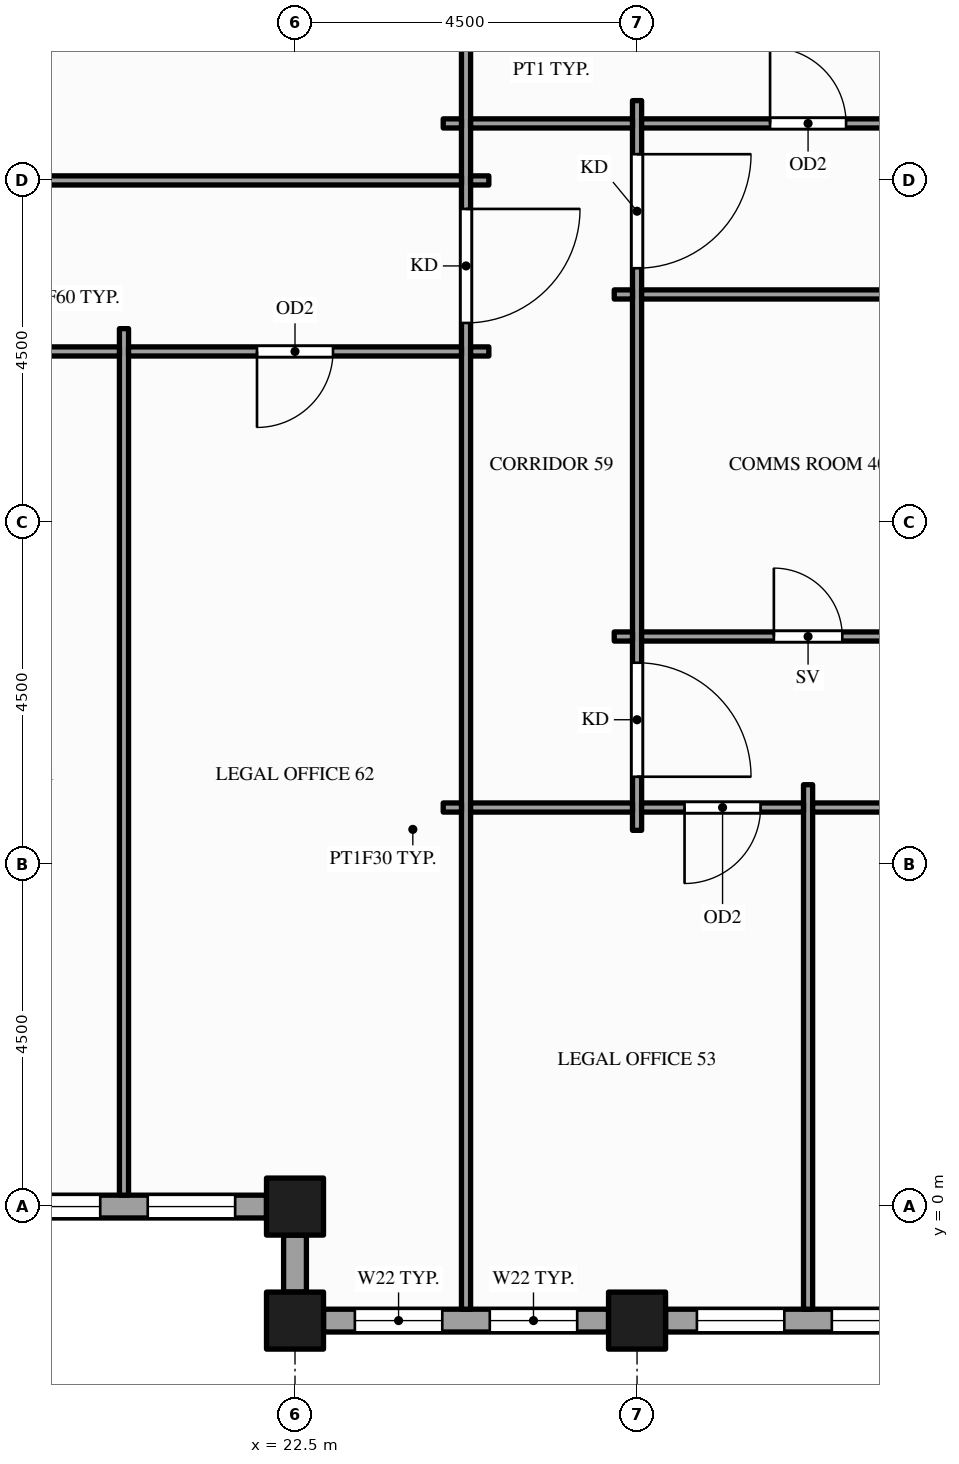
"""IFC4 building model, lengths in metres.
Left out: names, types, materials, properties, quantities, classifications, styles, units other than length and angle.
Written with IfcOpenShell. Run it as: python <this file> out.ifc"""

import sys

from ifc_helpers import new_model, si_unit, direction, frame, frame_2d, origin, origin_2d, place, context, subcontext, project, spatial, rectangle, hollow_rectangle, extrude, element, fill, save


model = new_model("IFC4")
c1 = context("Model", 3, precision=1e-05, world=origin(), true_north=direction((0.0, 1.0)))
c2 = subcontext(c1, "Body", "Model", "MODEL_VIEW")
j1 = project(units=[si_unit("LENGTHUNIT", "METRE"), si_unit("PLANEANGLEUNIT", "RADIAN")], contexts=[c1])
p1 = place(None, origin())
s1 = spatial("IfcSite", under=j1, at=p1, CompositionType="ELEMENT")
p2 = place(p1, origin())
s2 = spatial("IfcBuilding", under=s1, at=p2, CompositionType="ELEMENT")
p3 = place(p2, frame((0.0, 0.0, 239.0)))
s3 = spatial("IfcBuildingStorey", under=s2, at=p3, CompositionType="ELEMENT", Elevation=239.0)
for number, where, z_axis, x_axis in (
    (1, (22.5, -1.5, -0.15), (0.0, 0.0, 1.0), (1.0, 0.0, 0.0)),
    (2, (22.5, 0.0, -0.15), (0.0, 0.0, 1.0), (1.0, 0.0, 0.0)),
    (3, (27.0, -1.5, -0.15), (0.0, 0.0, 1.0), (1.0, 0.0, 0.0)),
):
    element("IfcColumn", number, at=place(p3, frame(where, z_axis=z_axis, x_axis=x_axis)), inside=s3, PredefinedType="COLUMN", context=c2, shape_type="SweptSolid", body=[
        extrude(hollow_rectangle(XDim=0.75, YDim=0.75, WallThickness=0.036, at=origin_2d()), origin(), (0.0, 0.0, 1.0), 3.85),
    ])
p4 = place(p3, frame((22.875, -1.5, 0.0), z_axis=(0.0, 0.0, 1.0), x_axis=(1.0, 0.0, 0.0)))
e4 = element("IfcWall", 4, at=p4, inside=s3, PredefinedType="STANDARD", context=c2, shape_type="SweptSolid", body=[
    extrude(rectangle(XDim=3.75, YDim=0.3, at=frame_2d((1.875, 0.0))), origin(), (0.0, 0.0, 1.0), 2.72),
])
p5 = place(p4, frame((0.413, 0.0, 0.9)))
e5 = element("IfcOpeningElement", 5, at=p5, cuts=e4, PredefinedType="OPENING", context=c2, shape_type="SweptSolid", body=[
    extrude(rectangle(XDim=1.15, YDim=1.5, at=frame_2d((0.575, 0.75))), frame((0.0, 0.16, 0.0), z_axis=(0.0, -1.0, 0.0), x_axis=(1.0, 0.0, 0.0)), (0.0, 0.0, 1.0), 0.32),
])
p6 = place(p4, frame((2.188, 0.0, 0.9)))
e6 = element("IfcOpeningElement", 6, at=p6, cuts=e4, PredefinedType="OPENING", context=c2, shape_type="SweptSolid", body=[
    extrude(rectangle(XDim=1.15, YDim=1.5, at=frame_2d((0.575, 0.75))), frame((0.0, 0.16, 0.0), z_axis=(0.0, -1.0, 0.0), x_axis=(1.0, 0.0, 0.0)), (0.0, 0.0, 1.0), 0.32),
])
p7 = place(p3, frame((27.375, -1.5, 0.0), z_axis=(0.0, 0.0, 1.0), x_axis=(1.0, 0.0, 0.0)))
e7 = element("IfcWall", 7, at=p7, inside=s3, PredefinedType="STANDARD", context=c2, shape_type="SweptSolid", body=[
    extrude(rectangle(XDim=3.75, YDim=0.3, at=frame_2d((1.875, 0.0))), origin(), (0.0, 0.0, 1.0), 2.72),
])
p8 = place(p7, frame((0.413, 0.0, 0.9)))
e8 = element("IfcOpeningElement", 8, at=p8, cuts=e7, PredefinedType="OPENING", context=c2, shape_type="SweptSolid", body=[
    extrude(rectangle(XDim=1.15, YDim=1.5, at=frame_2d((0.575, 0.75))), frame((0.0, 0.16, 0.0), z_axis=(0.0, -1.0, 0.0), x_axis=(1.0, 0.0, 0.0)), (0.0, 0.0, 1.0), 0.32),
])
p9 = place(p7, frame((2.188, 0.0, 0.9)))
e9 = element("IfcOpeningElement", 9, at=p9, cuts=e7, PredefinedType="OPENING", context=c2, shape_type="SweptSolid", body=[
    extrude(rectangle(XDim=1.15, YDim=1.5, at=frame_2d((0.575, 0.75))), frame((0.0, 0.16, 0.0), z_axis=(0.0, -1.0, 0.0), x_axis=(1.0, 0.0, 0.0)), (0.0, 0.0, 1.0), 0.32),
])
p10 = place(p3, frame((18.375, 0.0, 0.0), z_axis=(0.0, 0.0, 1.0), x_axis=(1.0, 0.0, 0.0)))
e10 = element("IfcWall", 10, at=p10, inside=s3, PredefinedType="STANDARD", context=c2, shape_type="SweptSolid", body=[
    extrude(rectangle(XDim=3.75, YDim=0.3, at=frame_2d((1.875, 0.0))), origin(), (0.0, 0.0, 1.0), 3.057),
])
p11 = place(p10, frame((0.413, 0.0, 0.9)))
e11 = element("IfcOpeningElement", 11, at=p11, cuts=e10, PredefinedType="OPENING", context=c2, shape_type="SweptSolid", body=[
    extrude(rectangle(XDim=1.15, YDim=2.0, at=frame_2d((0.575, 1.0))), frame((0.0, 0.16, 0.0), z_axis=(0.0, -1.0, 0.0), x_axis=(1.0, 0.0, 0.0)), (0.0, 0.0, 1.0), 0.32),
])
p12 = place(p10, frame((2.188, 0.0, 0.9)))
e12 = element("IfcOpeningElement", 12, at=p12, cuts=e10, PredefinedType="OPENING", context=c2, shape_type="SweptSolid", body=[
    extrude(rectangle(XDim=1.15, YDim=2.0, at=frame_2d((0.575, 1.0))), frame((0.0, 0.16, 0.0), z_axis=(0.0, -1.0, 0.0), x_axis=(1.0, 0.0, 0.0)), (0.0, 0.0, 1.0), 0.32),
])
p13 = place(p3, frame((22.5, -0.375, 0.0), z_axis=(0.0, 0.0, 1.0), x_axis=(0.0, -1.0, 0.0)))
e13 = element("IfcWall", 13, at=p13, inside=s3, PredefinedType="STANDARD", context=c2, shape_type="SweptSolid", body=[
    extrude(rectangle(XDim=0.75, YDim=0.3, at=frame_2d((0.375, 0.0))), origin(), (0.0, 0.0, 1.0), 3.057),
])
p14 = place(p3, frame((20.25, 0.15, 0.0), z_axis=(0.0, 0.0, 1.0), x_axis=(0.0, 1.0, 0.0)))
e14 = element("IfcWall", 14, at=p14, inside=s3, PredefinedType="PARTITIONING", context=c2, shape_type="SweptSolid", body=[
    extrude(rectangle(XDim=11.4, YDim=0.12, at=frame_2d((5.7, 0.0))), origin(), (0.0, 0.0, 1.0), 2.77),
])
p15 = place(p3, frame((24.75, -1.35, 0.0), z_axis=(0.0, 0.0, 1.0), x_axis=(0.0, 1.0, 0.0)))
e15 = element("IfcWall", 15, at=p15, inside=s3, PredefinedType="PARTITIONING", context=c2, shape_type="SweptSolid", body=[
    extrude(rectangle(XDim=24.101, YDim=0.12, at=frame_2d((12.05, 0.0))), origin(), (0.0, 0.0, 1.0), 2.72),
])
p16 = place(p15, frame((12.975, 0.0, 0.0)))
e16 = element("IfcOpeningElement", 16, at=p16, cuts=e15, PredefinedType="OPENING", context=c2, shape_type="SweptSolid", body=[
    extrude(rectangle(XDim=1.5, YDim=2.1, at=frame_2d((0.75, 1.05))), frame((0.0, 0.07, 0.0), z_axis=(0.0, -1.0, 0.0), x_axis=(1.0, 0.0, 0.0)), (0.0, 0.0, 1.0), 0.14),
])
p17 = place(p3, frame((27.0, 4.95, 0.0), z_axis=(0.0, 0.0, 1.0), x_axis=(0.0, 1.0, 0.0)))
e17 = element("IfcWall", 17, at=p17, inside=s3, PredefinedType="PARTITIONING", context=c2, shape_type="SweptSolid", body=[
    extrude(rectangle(XDim=9.6, YDim=0.12, at=frame_2d((4.8, 0.0))), origin(), (0.0, 0.0, 1.0), 2.77),
])
p18 = place(p17, frame((0.705, 0.0, 0.0)))
e18 = element("IfcOpeningElement", 18, at=p18, cuts=e17, PredefinedType="OPENING", context=c2, shape_type="SweptSolid", body=[
    extrude(rectangle(XDim=1.5, YDim=2.1, at=frame_2d((0.75, 1.05))), frame((0.0, 0.07, 0.0), z_axis=(0.0, -1.0, 0.0), x_axis=(1.0, 0.0, 0.0)), (0.0, 0.0, 1.0), 0.14),
])
p19 = place(p17, frame((7.395, 0.0, 0.0)))
e19 = element("IfcOpeningElement", 19, at=p19, cuts=e17, PredefinedType="OPENING", context=c2, shape_type="SweptSolid", body=[
    extrude(rectangle(XDim=1.5, YDim=2.1, at=frame_2d((0.75, 1.05))), frame((0.0, 0.07, 0.0), z_axis=(0.0, -1.0, 0.0), x_axis=(1.0, 0.0, 0.0)), (0.0, 0.0, 1.0), 0.14),
])
p20 = place(p3, frame((29.25, -1.35, 0.0), z_axis=(0.0, 0.0, 1.0), x_axis=(0.0, 1.0, 0.0)))
e20 = element("IfcWall", 20, at=p20, inside=s3, PredefinedType="PARTITIONING", context=c2, shape_type="SweptSolid", body=[
    extrude(rectangle(XDim=6.9, YDim=0.12, at=frame_2d((3.45, 0.0))), origin(), (0.0, 0.0, 1.0), 2.72),
])
p21 = place(p3, frame((24.45, 5.25, 0.0), z_axis=(0.0, 0.0, 1.0), x_axis=(1.0, 0.0, 0.0)))
e21 = element("IfcWall", 21, at=p21, inside=s3, PredefinedType="PARTITIONING", context=c2, shape_type="SweptSolid", body=[
    extrude(rectangle(XDim=0.24, YDim=0.12, at=frame_2d((0.12, 0.0))), origin(), (0.0, 0.0, 1.0), 2.77),
])
p22 = place(p3, frame((24.81, 5.25, 0.0), z_axis=(0.0, 0.0, 1.0), x_axis=(1.0, 0.0, 0.0)))
e22 = element("IfcWall", 22, at=p22, inside=s3, PredefinedType="PARTITIONING", context=c2, shape_type="SweptSolid", body=[
    extrude(rectangle(XDim=2.13, YDim=0.12, at=frame_2d((1.065, 0.0))), origin(), (0.0, 0.0, 1.0), 2.77),
])
p23 = place(p3, frame((27.06, 5.25, 0.0), z_axis=(0.0, 0.0, 1.0), x_axis=(1.0, 0.0, 0.0)))
e23 = element("IfcWall", 23, at=p23, inside=s3, PredefinedType="PARTITIONING", context=c2, shape_type="SweptSolid", body=[
    extrude(rectangle(XDim=2.13, YDim=0.12, at=frame_2d((1.065, 0.0))), origin(), (0.0, 0.0, 1.0), 2.77),
])
p24 = place(p23, frame((0.565, 0.0, 0.0)))
e24 = element("IfcOpeningElement", 24, at=p24, cuts=e23, PredefinedType="OPENING", context=c2, shape_type="SweptSolid", body=[
    extrude(rectangle(XDim=1.0, YDim=2.1, at=frame_2d((0.5, 1.05))), frame((0.0, 0.07, 0.0), z_axis=(0.0, -1.0, 0.0), x_axis=(1.0, 0.0, 0.0)), (0.0, 0.0, 1.0), 0.14),
])
p25 = place(p3, frame((29.31, 5.25, 0.0), z_axis=(0.0, 0.0, 1.0), x_axis=(1.0, 0.0, 0.0)))
e25 = element("IfcWall", 25, at=p25, inside=s3, PredefinedType="PARTITIONING", context=c2, shape_type="SweptSolid", body=[
    extrude(rectangle(XDim=11.13, YDim=0.12, at=frame_2d((5.565, 0.0))), origin(), (0.0, 0.0, 1.0), 2.77),
])
p26 = place(p25, frame((4.665, 0.0, 0.0)))
e26 = element("IfcOpeningElement", 26, at=p26, cuts=e25, PredefinedType="OPENING", context=c2, shape_type="SweptSolid", body=[
    extrude(rectangle(XDim=1.8, YDim=2.1, at=frame_2d((0.9, 1.05))), frame((0.0, 0.07, 0.0), z_axis=(0.0, -1.0, 0.0), x_axis=(1.0, 0.0, 0.0)), (0.0, 0.0, 1.0), 0.14),
])
p27 = place(p3, frame((26.7, 7.5, 0.0), z_axis=(0.0, 0.0, 1.0), x_axis=(1.0, 0.0, 0.0)))
e27 = element("IfcWall", 27, at=p27, inside=s3, PredefinedType="PARTITIONING", context=c2, shape_type="SweptSolid", body=[
    extrude(rectangle(XDim=0.24, YDim=0.12, at=frame_2d((0.12, 0.0))), origin(), (0.0, 0.0, 1.0), 2.77),
])
p28 = place(p3, frame((27.06, 7.5, 0.0), z_axis=(0.0, 0.0, 1.0), x_axis=(1.0, 0.0, 0.0)))
e28 = element("IfcWall", 28, at=p28, inside=s3, PredefinedType="PARTITIONING", context=c2, shape_type="SweptSolid", body=[
    extrude(rectangle(XDim=4.38, YDim=0.12, at=frame_2d((2.19, 0.0))), origin(), (0.0, 0.0, 1.0), 2.77),
])
p29 = place(p28, frame((1.74, 0.0, 0.0)))
e29 = element("IfcOpeningElement", 29, at=p29, cuts=e28, PredefinedType="OPENING", context=c2, shape_type="SweptSolid", body=[
    extrude(rectangle(XDim=0.9, YDim=2.1, at=frame_2d((0.45, 1.05))), frame((0.0, 0.07, 0.0), z_axis=(0.0, -1.0, 0.0), x_axis=(1.0, 0.0, 0.0)), (0.0, 0.0, 1.0), 0.14),
])
p30 = place(p3, frame((15.81, 11.25, 0.0), z_axis=(0.0, 0.0, 1.0), x_axis=(1.0, 0.0, 0.0)))
e30 = element("IfcWall", 30, at=p30, inside=s3, PredefinedType="PARTITIONING", context=c2, shape_type="SweptSolid", body=[
    extrude(rectangle(XDim=4.38, YDim=0.12, at=frame_2d((2.19, 0.0))), origin(), (0.0, 0.0, 1.0), 2.77),
])
p31 = place(p30, frame((1.74, 0.0, 0.0)))
e31 = element("IfcOpeningElement", 31, at=p31, cuts=e30, PredefinedType="OPENING", context=c2, shape_type="SweptSolid", body=[
    extrude(rectangle(XDim=0.9, YDim=2.1, at=frame_2d((0.45, 1.05))), frame((0.0, 0.07, 0.0), z_axis=(0.0, -1.0, 0.0), x_axis=(1.0, 0.0, 0.0)), (0.0, 0.0, 1.0), 0.14),
])
p32 = place(p3, frame((20.31, 11.25, 0.0), z_axis=(0.0, 0.0, 1.0), x_axis=(1.0, 0.0, 0.0)))
e32 = element("IfcWall", 32, at=p32, inside=s3, PredefinedType="PARTITIONING", context=c2, shape_type="SweptSolid", body=[
    extrude(rectangle(XDim=4.38, YDim=0.12, at=frame_2d((2.19, 0.0))), origin(), (0.0, 0.0, 1.0), 2.77),
])
p33 = place(p32, frame((1.69, 0.0, 0.0)))
e33 = element("IfcOpeningElement", 33, at=p33, cuts=e32, PredefinedType="OPENING", context=c2, shape_type="SweptSolid", body=[
    extrude(rectangle(XDim=1.0, YDim=2.1, at=frame_2d((0.5, 1.05))), frame((0.0, 0.07, 0.0), z_axis=(0.0, -1.0, 0.0), x_axis=(1.0, 0.0, 0.0)), (0.0, 0.0, 1.0), 0.14),
])
for number, where, z_axis, x_axis in (
    (34, (24.81, 11.25, 0.0), (0.0, 0.0, 1.0), (1.0, 0.0, 0.0)),
    (35, (26.7, 12.0, 0.0), (0.0, 0.0, 1.0), (1.0, 0.0, 0.0)),
):
    element("IfcWall", number, at=place(p3, frame(where, z_axis=z_axis, x_axis=x_axis)), inside=s3, PredefinedType="PARTITIONING", context=c2, shape_type="SweptSolid", body=[
        extrude(rectangle(XDim=0.24, YDim=0.12, at=frame_2d((0.12, 0.0))), origin(), (0.0, 0.0, 1.0), 2.77),
    ])
p34 = place(p3, frame((27.06, 12.0, 0.0), z_axis=(0.0, 0.0, 1.0), x_axis=(1.0, 0.0, 0.0)))
e36 = element("IfcWall", 36, at=p34, inside=s3, PredefinedType="PARTITIONING", context=c2, shape_type="SweptSolid", body=[
    extrude(rectangle(XDim=4.38, YDim=0.12, at=frame_2d((2.19, 0.0))), origin(), (0.0, 0.0, 1.0), 2.77),
])
p35 = place(p3, frame((11.31, 13.5, 0.0), z_axis=(0.0, 0.0, 1.0), x_axis=(1.0, 0.0, 0.0)))
e37 = element("IfcWall", 37, at=p35, inside=s3, PredefinedType="PARTITIONING", context=c2, shape_type="SweptSolid", body=[
    extrude(rectangle(XDim=13.38, YDim=0.12, at=frame_2d((6.69, 0.0))), origin(), (0.0, 0.0, 1.0), 2.77),
])
p36 = place(p35, frame((3.54, 0.0, 0.0)))
e38 = element("IfcOpeningElement", 38, at=p36, cuts=e37, PredefinedType="OPENING", context=c2, shape_type="SweptSolid", body=[
    extrude(rectangle(XDim=1.8, YDim=2.1, at=frame_2d((0.9, 1.05))), frame((0.0, 0.07, 0.0), z_axis=(0.0, -1.0, 0.0), x_axis=(1.0, 0.0, 0.0)), (0.0, 0.0, 1.0), 0.14),
])
for number, where, z_axis, x_axis in (
    (39, (24.81, 13.5, 0.0), (0.0, 0.0, 1.0), (1.0, 0.0, 0.0)),
    (40, (24.45, 14.25, 0.0), (0.0, 0.0, 1.0), (1.0, 0.0, 0.0)),
):
    element("IfcWall", number, at=place(p3, frame(where, z_axis=z_axis, x_axis=x_axis)), inside=s3, PredefinedType="PARTITIONING", context=c2, shape_type="SweptSolid", body=[
        extrude(rectangle(XDim=0.24, YDim=0.12, at=frame_2d((0.12, 0.0))), origin(), (0.0, 0.0, 1.0), 2.77),
    ])
p37 = place(p3, frame((24.81, 14.25, 0.0), z_axis=(0.0, 0.0, 1.0), x_axis=(1.0, 0.0, 0.0)))
e41 = element("IfcWall", 41, at=p37, inside=s3, PredefinedType="PARTITIONING", context=c2, shape_type="SweptSolid", body=[
    extrude(rectangle(XDim=2.13, YDim=0.12, at=frame_2d((1.065, 0.0))), origin(), (0.0, 0.0, 1.0), 2.77),
])
p38 = place(p3, frame((27.06, 14.25, 0.0), z_axis=(0.0, 0.0, 1.0), x_axis=(1.0, 0.0, 0.0)))
e42 = element("IfcWall", 42, at=p38, inside=s3, PredefinedType="PARTITIONING", context=c2, shape_type="SweptSolid", body=[
    extrude(rectangle(XDim=4.38, YDim=0.12, at=frame_2d((2.19, 0.0))), origin(), (0.0, 0.0, 1.0), 2.77),
])
p39 = place(p38, frame((1.69, 0.0, 0.0)))
e43 = element("IfcOpeningElement", 43, at=p39, cuts=e42, PredefinedType="OPENING", context=c2, shape_type="SweptSolid", body=[
    extrude(rectangle(XDim=1.0, YDim=2.1, at=frame_2d((0.5, 1.05))), frame((0.0, 0.07, 0.0), z_axis=(0.0, -1.0, 0.0), x_axis=(1.0, 0.0, 0.0)), (0.0, 0.0, 1.0), 0.14),
])
p40 = place(p5, origin())
e44 = element("IfcWindow", 44, at=p40, inside=s3, PartitioningType="SINGLE_PANEL", PredefinedType="WINDOW", context=c2, shape_type="SweptSolid", body=[
    extrude(rectangle(XDim=1.15, YDim=1.5, at=frame_2d((0.575, 0.75))), frame((0.0, 0.03, 0.0), z_axis=(0.0, -1.0, 0.0), x_axis=(1.0, 0.0, 0.0)), (0.0, 0.0, 1.0), 0.06),
])
fill(e5, e44)
p41 = place(p6, origin())
e45 = element("IfcWindow", 45, at=p41, inside=s3, PartitioningType="SINGLE_PANEL", PredefinedType="WINDOW", context=c2, shape_type="SweptSolid", body=[
    extrude(rectangle(XDim=1.15, YDim=1.5, at=frame_2d((0.575, 0.75))), frame((0.0, 0.03, 0.0), z_axis=(0.0, -1.0, 0.0), x_axis=(1.0, 0.0, 0.0)), (0.0, 0.0, 1.0), 0.06),
])
fill(e6, e45)
p42 = place(p8, origin())
e46 = element("IfcWindow", 46, at=p42, inside=s3, PartitioningType="SINGLE_PANEL", PredefinedType="WINDOW", context=c2, shape_type="SweptSolid", body=[
    extrude(rectangle(XDim=1.15, YDim=1.5, at=frame_2d((0.575, 0.75))), frame((0.0, 0.03, 0.0), z_axis=(0.0, -1.0, 0.0), x_axis=(1.0, 0.0, 0.0)), (0.0, 0.0, 1.0), 0.06),
])
fill(e8, e46)
p43 = place(p9, origin())
e47 = element("IfcWindow", 47, at=p43, inside=s3, PartitioningType="SINGLE_PANEL", PredefinedType="WINDOW", context=c2, shape_type="SweptSolid", body=[
    extrude(rectangle(XDim=1.15, YDim=1.5, at=frame_2d((0.575, 0.75))), frame((0.0, 0.03, 0.0), z_axis=(0.0, -1.0, 0.0), x_axis=(1.0, 0.0, 0.0)), (0.0, 0.0, 1.0), 0.06),
])
fill(e9, e47)
p44 = place(p11, origin())
e48 = element("IfcWindow", 48, at=p44, inside=s3, PartitioningType="SINGLE_PANEL", PredefinedType="WINDOW", context=c2, shape_type="SweptSolid", body=[
    extrude(rectangle(XDim=1.15, YDim=2.0, at=frame_2d((0.575, 1.0))), frame((0.0, 0.03, 0.0), z_axis=(0.0, -1.0, 0.0), x_axis=(1.0, 0.0, 0.0)), (0.0, 0.0, 1.0), 0.06),
])
fill(e11, e48)
p45 = place(p12, origin())
e49 = element("IfcWindow", 49, at=p45, inside=s3, PartitioningType="SINGLE_PANEL", PredefinedType="WINDOW", context=c2, shape_type="SweptSolid", body=[
    extrude(rectangle(XDim=1.15, YDim=2.0, at=frame_2d((0.575, 1.0))), frame((0.0, 0.03, 0.0), z_axis=(0.0, -1.0, 0.0), x_axis=(1.0, 0.0, 0.0)), (0.0, 0.0, 1.0), 0.06),
])
fill(e12, e49)
p46 = place(p16, origin())
e50 = element("IfcDoor", 50, at=p46, inside=s3, OperationType="SINGLE_SWING_RIGHT", PredefinedType="DOOR", context=c2, shape_type="SweptSolid", body=[
    extrude(rectangle(XDim=1.5, YDim=2.1, at=frame_2d((0.75, 1.05))), frame((0.0, 0.025, 0.0), z_axis=(0.0, -1.0, 0.0), x_axis=(1.0, 0.0, 0.0)), (0.0, 0.0, 1.0), 0.05),
])
fill(e16, e50)
p47 = place(p18, origin())
e51 = element("IfcDoor", 51, at=p47, inside=s3, OperationType="SINGLE_SWING_LEFT", PredefinedType="DOOR", context=c2, shape_type="SweptSolid", body=[
    extrude(rectangle(XDim=1.5, YDim=2.1, at=frame_2d((0.75, 1.05))), frame((0.0, 0.025, 0.0), z_axis=(0.0, -1.0, 0.0), x_axis=(1.0, 0.0, 0.0)), (0.0, 0.0, 1.0), 0.05),
])
fill(e18, e51)
p48 = place(p19, origin())
e52 = element("IfcDoor", 52, at=p48, inside=s3, OperationType="SINGLE_SWING_RIGHT", PredefinedType="DOOR", context=c2, shape_type="SweptSolid", body=[
    extrude(rectangle(XDim=1.5, YDim=2.1, at=frame_2d((0.75, 1.05))), frame((0.0, 0.025, 0.0), z_axis=(0.0, -1.0, 0.0), x_axis=(1.0, 0.0, 0.0)), (0.0, 0.0, 1.0), 0.05),
])
fill(e19, e52)
p49 = place(p33, origin())
e53 = element("IfcDoor", 53, at=p49, inside=s3, OperationType="SINGLE_SWING_LEFT", PredefinedType="DOOR", context=c2, shape_type="SweptSolid", body=[
    extrude(rectangle(XDim=1.0, YDim=2.1, at=frame_2d((0.5, 1.05))), frame((0.0, 0.025, 0.0), z_axis=(0.0, -1.0, 0.0), x_axis=(1.0, 0.0, 0.0)), (0.0, 0.0, 1.0), 0.05),
])
fill(e33, e53)
p50 = place(p29, origin())
e54 = element("IfcDoor", 54, at=p50, inside=s3, OperationType="SINGLE_SWING_LEFT", PredefinedType="DOOR", context=c2, shape_type="SweptSolid", body=[
    extrude(rectangle(XDim=0.9, YDim=2.1, at=frame_2d((0.45, 1.05))), frame((0.0, 0.025, 0.0), z_axis=(0.0, -1.0, 0.0), x_axis=(1.0, 0.0, 0.0)), (0.0, 0.0, 1.0), 0.05),
])
fill(e29, e54)
p51 = place(p24, origin())
e55 = element("IfcDoor", 55, at=p51, inside=s3, OperationType="SINGLE_SWING_LEFT", PredefinedType="DOOR", context=c2, shape_type="SweptSolid", body=[
    extrude(rectangle(XDim=1.0, YDim=2.1, at=frame_2d((0.5, 1.05))), frame((0.0, 0.025, 0.0), z_axis=(0.0, -1.0, 0.0), x_axis=(1.0, 0.0, 0.0)), (0.0, 0.0, 1.0), 0.05),
])
fill(e24, e55)
p52 = place(p39, origin())
e56 = element("IfcDoor", 56, at=p52, inside=s3, OperationType="SINGLE_SWING_LEFT", PredefinedType="DOOR", context=c2, shape_type="SweptSolid", body=[
    extrude(rectangle(XDim=1.0, YDim=2.1, at=frame_2d((0.5, 1.05))), frame((0.0, 0.025, 0.0), z_axis=(0.0, -1.0, 0.0), x_axis=(1.0, 0.0, 0.0)), (0.0, 0.0, 1.0), 0.05),
])
fill(e43, e56)
save(model, sys.argv[1])
